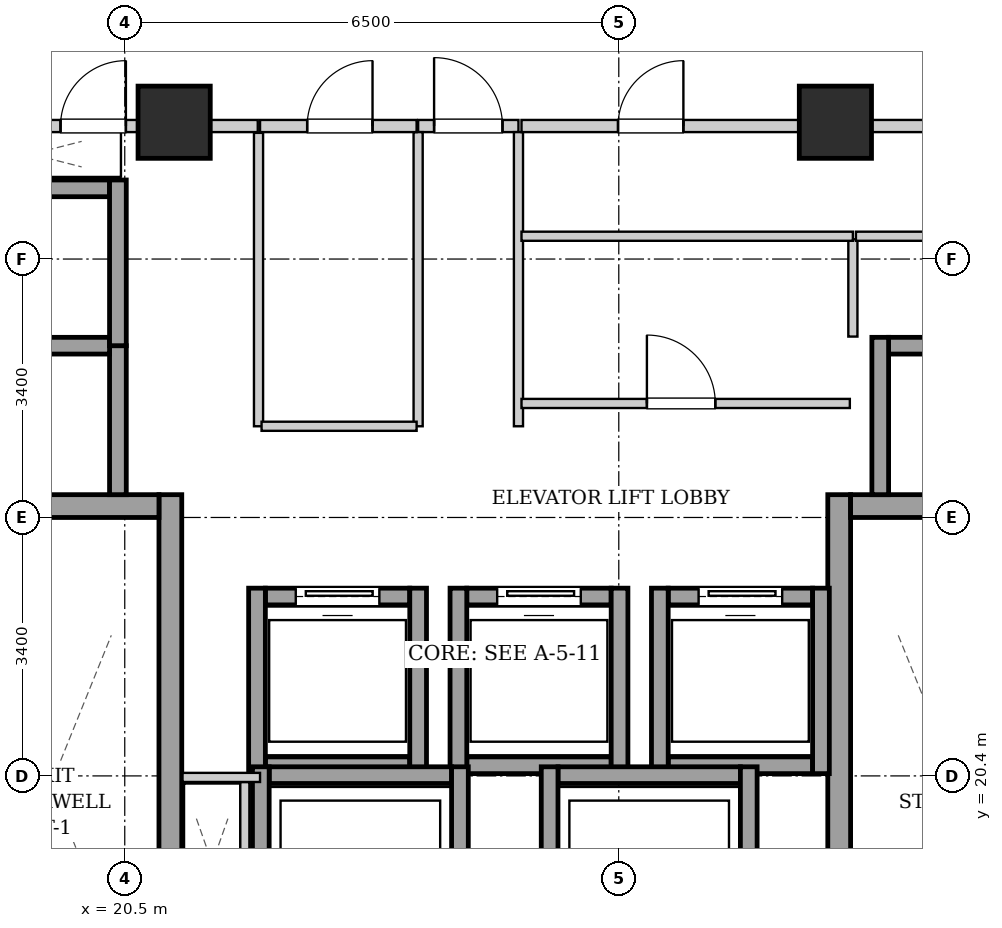
"""IFC4 building model, lengths in metres.
Left out: names, types, materials, properties, quantities, classifications, styles, units other than length and angle.
Written with IfcOpenShell. Run it as: python <this file> out.ifc"""

import sys

from ifc_helpers import new_model, si_unit, direction, frame, frame_2d, origin, origin_2d, place, context, subcontext, project, spatial, rectangle, extrude, element, fill, save


model = new_model("IFC4")
c1 = context("Model", 3, precision=1e-05, world=origin(), true_north=direction((0.0, 1.0)))
c2 = subcontext(c1, "Body", "Model", "MODEL_VIEW")
j1 = project(units=[si_unit("LENGTHUNIT", "METRE"), si_unit("PLANEANGLEUNIT", "RADIAN")], contexts=[c1])
p1 = place(None, origin())
s1 = spatial("IfcSite", under=j1, at=p1, CompositionType="ELEMENT")
p2 = place(p1, origin())
s2 = spatial("IfcBuilding", under=s1, at=p2, CompositionType="ELEMENT")
p3 = place(p2, frame((0.0, 0.0, 156.9)))
s3 = spatial("IfcBuildingStorey", under=s2, at=p3, CompositionType="ELEMENT", Elevation=156.9)
for number, where, z_axis, x_axis in (
    (1, (21.15, 29.0, 0.0), (0.0, 0.0, 1.0), (1.0, 0.0, 0.0)),
    (2, (29.85, 29.0, 0.0), (0.0, 0.0, 1.0), (1.0, 0.0, 0.0)),
):
    element("IfcColumn", number, at=place(p3, frame(where, z_axis=z_axis, x_axis=x_axis)), inside=s3, PredefinedType="COLUMN", context=c2, shape_type="SweptSolid", body=[
        extrude(rectangle(XDim=0.95, YDim=0.95, at=origin_2d()), origin(), (0.0, 0.0, 1.0), 3.25),
    ])
p4 = place(p3, frame((21.1, 15.1, 0.0), z_axis=(0.0, 0.0, 1.0), x_axis=(0.0, 1.0, 0.0)))
e3 = element("IfcWall", 3, at=p4, inside=s3, PredefinedType="SHEAR", context=c2, shape_type="SweptSolid", body=[
    extrude(rectangle(XDim=9.0, YDim=0.3, at=frame_2d((4.5, 0.0))), origin(), (0.0, 0.0, 1.0), 2.99),
])
p5 = place(p3, frame((18.1, 23.95, 0.0), z_axis=(0.0, 0.0, 1.0), x_axis=(1.0, 0.0, 0.0)))
e4 = element("IfcWall", 4, at=p5, inside=s3, PredefinedType="SHEAR", context=c2, shape_type="SweptSolid", body=[
    extrude(rectangle(XDim=2.85, YDim=0.3, at=frame_2d((1.425, 0.0))), origin(), (0.0, 0.0, 1.0), 2.99),
])
p6 = place(p3, frame((29.9, 15.1, 0.0), z_axis=(0.0, 0.0, 1.0), x_axis=(0.0, 1.0, 0.0)))
e5 = element("IfcWall", 5, at=p6, inside=s3, PredefinedType="SHEAR", context=c2, shape_type="SweptSolid", body=[
    extrude(rectangle(XDim=9.0, YDim=0.3, at=frame_2d((4.5, 0.0))), origin(), (0.0, 0.0, 1.0), 2.99),
])
p7 = place(p3, frame((30.05, 23.95, 0.0), z_axis=(0.0, 0.0, 1.0), x_axis=(1.0, 0.0, 0.0)))
e6 = element("IfcWall", 6, at=p7, inside=s3, PredefinedType="SHEAR", context=c2, shape_type="SweptSolid", body=[
    extrude(rectangle(XDim=2.85, YDim=0.3, at=frame_2d((1.425, 0.0))), origin(), (0.0, 0.0, 1.0), 2.99),
])
p8 = place(p3, frame((22.35, 20.54, 0.0), z_axis=(0.0, 0.0, 1.0), x_axis=(1.0, 0.0, 0.0)))
e7 = element("IfcWall", 7, at=p8, inside=s3, PredefinedType="SHEAR", context=c2, shape_type="SweptSolid", body=[
    extrude(rectangle(XDim=1.9, YDim=0.22, at=frame_2d((0.95, 0.0))), origin(), (0.0, 0.0, 1.0), 2.99),
])
p9 = place(p3, frame((22.35, 22.76, 0.0), z_axis=(0.0, 0.0, 1.0), x_axis=(1.0, 0.0, 0.0)))
e8 = element("IfcWall", 8, at=p9, inside=s3, PredefinedType="SHEAR", context=c2, shape_type="SweptSolid", body=[
    extrude(rectangle(XDim=1.9, YDim=0.22, at=frame_2d((0.95, 0.0))), origin(), (0.0, 0.0, 1.0), 2.99),
])
p10 = place(p9, frame((0.4, 0.0, 0.0)))
e9 = element("IfcOpeningElement", 9, at=p10, cuts=e8, PredefinedType="OPENING", context=c2, shape_type="SweptSolid", body=[
    extrude(rectangle(XDim=1.1, YDim=2.15, at=frame_2d((0.55, 1.075))), frame((0.0, 0.12, 0.0), z_axis=(0.0, -1.0, 0.0), x_axis=(1.0, 0.0, 0.0)), (0.0, 0.0, 1.0), 0.24),
])
for number, where, z_axis, x_axis in (
    (10, (22.24, 20.43, 0.0), (0.0, 0.0, 1.0), (0.0, 1.0, 0.0)),
    (11, (24.36, 20.43, 0.0), (0.0, 0.0, 1.0), (0.0, 1.0, 0.0)),
):
    element("IfcWall", number, at=place(p3, frame(where, z_axis=z_axis, x_axis=x_axis)), inside=s3, PredefinedType="SHEAR", context=c2, shape_type="SweptSolid", body=[
        extrude(rectangle(XDim=2.44, YDim=0.22, at=frame_2d((1.22, 0.0))), origin(), (0.0, 0.0, 1.0), 2.99),
    ])
p11 = place(p3, frame((25.0, 20.54, 0.0), z_axis=(0.0, 0.0, 1.0), x_axis=(1.0, 0.0, 0.0)))
e12 = element("IfcWall", 12, at=p11, inside=s3, PredefinedType="SHEAR", context=c2, shape_type="SweptSolid", body=[
    extrude(rectangle(XDim=1.9, YDim=0.22, at=frame_2d((0.95, 0.0))), origin(), (0.0, 0.0, 1.0), 2.99),
])
p12 = place(p3, frame((25.0, 22.76, 0.0), z_axis=(0.0, 0.0, 1.0), x_axis=(1.0, 0.0, 0.0)))
e13 = element("IfcWall", 13, at=p12, inside=s3, PredefinedType="SHEAR", context=c2, shape_type="SweptSolid", body=[
    extrude(rectangle(XDim=1.9, YDim=0.22, at=frame_2d((0.95, 0.0))), origin(), (0.0, 0.0, 1.0), 2.99),
])
p13 = place(p12, frame((0.4, 0.0, 0.0)))
e14 = element("IfcOpeningElement", 14, at=p13, cuts=e13, PredefinedType="OPENING", context=c2, shape_type="SweptSolid", body=[
    extrude(rectangle(XDim=1.1, YDim=2.15, at=frame_2d((0.55, 1.075))), frame((0.0, 0.12, 0.0), z_axis=(0.0, -1.0, 0.0), x_axis=(1.0, 0.0, 0.0)), (0.0, 0.0, 1.0), 0.24),
])
for number, where, z_axis, x_axis in (
    (15, (24.89, 20.43, 0.0), (0.0, 0.0, 1.0), (0.0, 1.0, 0.0)),
    (16, (27.01, 20.43, 0.0), (0.0, 0.0, 1.0), (0.0, 1.0, 0.0)),
):
    element("IfcWall", number, at=place(p3, frame(where, z_axis=z_axis, x_axis=x_axis)), inside=s3, PredefinedType="SHEAR", context=c2, shape_type="SweptSolid", body=[
        extrude(rectangle(XDim=2.44, YDim=0.22, at=frame_2d((1.22, 0.0))), origin(), (0.0, 0.0, 1.0), 2.99),
    ])
p14 = place(p3, frame((27.65, 20.54, 0.0), z_axis=(0.0, 0.0, 1.0), x_axis=(1.0, 0.0, 0.0)))
e17 = element("IfcWall", 17, at=p14, inside=s3, PredefinedType="SHEAR", context=c2, shape_type="SweptSolid", body=[
    extrude(rectangle(XDim=1.9, YDim=0.22, at=frame_2d((0.95, 0.0))), origin(), (0.0, 0.0, 1.0), 2.99),
])
p15 = place(p3, frame((27.65, 22.76, 0.0), z_axis=(0.0, 0.0, 1.0), x_axis=(1.0, 0.0, 0.0)))
e18 = element("IfcWall", 18, at=p15, inside=s3, PredefinedType="SHEAR", context=c2, shape_type="SweptSolid", body=[
    extrude(rectangle(XDim=1.9, YDim=0.22, at=frame_2d((0.95, 0.0))), origin(), (0.0, 0.0, 1.0), 2.99),
])
p16 = place(p15, frame((0.4, 0.0, 0.0)))
e19 = element("IfcOpeningElement", 19, at=p16, cuts=e18, PredefinedType="OPENING", context=c2, shape_type="SweptSolid", body=[
    extrude(rectangle(XDim=1.1, YDim=2.15, at=frame_2d((0.55, 1.075))), frame((0.0, 0.12, 0.0), z_axis=(0.0, -1.0, 0.0), x_axis=(1.0, 0.0, 0.0)), (0.0, 0.0, 1.0), 0.24),
])
for number, where, z_axis, x_axis in (
    (20, (27.54, 20.43, 0.0), (0.0, 0.0, 1.0), (0.0, 1.0, 0.0)),
    (21, (29.66, 20.43, 0.0), (0.0, 0.0, 1.0), (0.0, 1.0, 0.0)),
):
    element("IfcWall", number, at=place(p3, frame(where, z_axis=z_axis, x_axis=x_axis)), inside=s3, PredefinedType="SHEAR", context=c2, shape_type="SweptSolid", body=[
        extrude(rectangle(XDim=2.44, YDim=0.22, at=frame_2d((1.22, 0.0))), origin(), (0.0, 0.0, 1.0), 2.99),
    ])
p17 = place(p3, frame((20.41, 24.1, 0.0), z_axis=(0.0, 0.0, 1.0), x_axis=(0.0, 1.0, 0.0)))
e22 = element("IfcWall", 22, at=p17, inside=s3, PredefinedType="SHEAR", context=c2, shape_type="SweptSolid", body=[
    extrude(rectangle(XDim=1.96, YDim=0.22, at=frame_2d((0.98, 0.0))), origin(), (0.0, 0.0, 1.0), 2.99),
])
for number, where, z_axis, x_axis in (
    (23, (18.4, 26.06, 0.0), (0.0, 0.0, 1.0), (1.0, 0.0, 0.0)),
    (24, (18.4, 28.13, 0.0), (0.0, 0.0, 1.0), (1.0, 0.0, 0.0)),
):
    element("IfcWall", number, at=place(p3, frame(where, z_axis=z_axis, x_axis=x_axis)), inside=s3, PredefinedType="SHEAR", context=c2, shape_type="SweptSolid", body=[
        extrude(rectangle(XDim=1.9, YDim=0.22, at=frame_2d((0.95, 0.0))), origin(), (0.0, 0.0, 1.0), 2.99),
    ])
p18 = place(p3, frame((20.41, 26.06, 0.0), z_axis=(0.0, 0.0, 1.0), x_axis=(0.0, 1.0, 0.0)))
e25 = element("IfcWall", 25, at=p18, inside=s3, PredefinedType="SHEAR", context=c2, shape_type="SweptSolid", body=[
    extrude(rectangle(XDim=2.18, YDim=0.22, at=frame_2d((1.09, 0.0))), origin(), (0.0, 0.0, 1.0), 2.99),
])
p19 = place(p3, frame((30.55, 26.06, 0.0), z_axis=(0.0, 0.0, 1.0), x_axis=(1.0, 0.0, 0.0)))
e26 = element("IfcWall", 26, at=p19, inside=s3, PredefinedType="SHEAR", context=c2, shape_type="SweptSolid", body=[
    extrude(rectangle(XDim=1.9, YDim=0.22, at=frame_2d((0.95, 0.0))), origin(), (0.0, 0.0, 1.0), 2.99),
])
p20 = place(p3, frame((30.44, 24.1, 0.0), z_axis=(0.0, 0.0, 1.0), x_axis=(0.0, 1.0, 0.0)))
e27 = element("IfcWall", 27, at=p20, inside=s3, PredefinedType="SHEAR", context=c2, shape_type="SweptSolid", body=[
    extrude(rectangle(XDim=2.07, YDim=0.22, at=frame_2d((1.035, 0.0))), origin(), (0.0, 0.0, 1.0), 2.99),
])
p21 = place(p3, frame((22.4, 20.41, 0.0), z_axis=(0.0, 0.0, 1.0), x_axis=(1.0, 0.0, 0.0)))
e28 = element("IfcWall", 28, at=p21, inside=s3, PredefinedType="SHEAR", context=c2, shape_type="SweptSolid", body=[
    extrude(rectangle(XDim=2.4, YDim=0.22, at=frame_2d((1.2, 0.0))), origin(), (0.0, 0.0, 1.0), 2.99),
])
for number, where, z_axis, x_axis in (
    (29, (22.29, 17.98, 0.0), (0.0, 0.0, 1.0), (0.0, 1.0, 0.0)),
    (30, (24.91, 17.98, 0.0), (0.0, 0.0, 1.0), (0.0, 1.0, 0.0)),
):
    element("IfcWall", number, at=place(p3, frame(where, z_axis=z_axis, x_axis=x_axis)), inside=s3, PredefinedType="SHEAR", context=c2, shape_type="SweptSolid", body=[
        extrude(rectangle(XDim=2.54, YDim=0.22, at=frame_2d((1.27, 0.0))), origin(), (0.0, 0.0, 1.0), 2.99),
    ])
p22 = place(p3, frame((26.2, 20.41, 0.0), z_axis=(0.0, 0.0, 1.0), x_axis=(1.0, 0.0, 0.0)))
e31 = element("IfcWall", 31, at=p22, inside=s3, PredefinedType="SHEAR", context=c2, shape_type="SweptSolid", body=[
    extrude(rectangle(XDim=2.4, YDim=0.22, at=frame_2d((1.2, 0.0))), origin(), (0.0, 0.0, 1.0), 2.99),
])
for number, where, z_axis, x_axis in (
    (32, (26.09, 17.98, 0.0), (0.0, 0.0, 1.0), (0.0, 1.0, 0.0)),
    (33, (28.71, 17.98, 0.0), (0.0, 0.0, 1.0), (0.0, 1.0, 0.0)),
):
    element("IfcWall", number, at=place(p3, frame(where, z_axis=z_axis, x_axis=x_axis)), inside=s3, PredefinedType="SHEAR", context=c2, shape_type="SweptSolid", body=[
        extrude(rectangle(XDim=2.54, YDim=0.22, at=frame_2d((1.27, 0.0))), origin(), (0.0, 0.0, 1.0), 2.99),
    ])
p23 = place(p3, frame((24.36, 28.95, 0.0), z_axis=(0.0, 0.0, 1.0), x_axis=(1.0, 0.0, 0.0)))
e34 = element("IfcWall", 34, at=p23, inside=s3, PredefinedType="PARTITIONING", context=c2, shape_type="SweptSolid", body=[
    extrude(rectangle(XDim=1.32, YDim=0.16, at=frame_2d((0.66, 0.0))), origin(), (0.0, 0.0, 1.0), 2.442),
])
p24 = place(p23, frame((0.21, 0.0, 0.0)))
e35 = element("IfcOpeningElement", 35, at=p24, cuts=e34, PredefinedType="OPENING", context=c2, shape_type="SweptSolid", body=[
    extrude(rectangle(XDim=0.9, YDim=2.05, at=frame_2d((0.45, 1.025))), frame((0.0, 0.09, 0.0), z_axis=(0.0, -1.0, 0.0), x_axis=(1.0, 0.0, 0.0)), (0.0, 0.0, 1.0), 0.18),
])
p25 = place(p3, frame((17.96, 28.95, 0.0), z_axis=(0.0, 0.0, 1.0), x_axis=(1.0, 0.0, 0.0)))
e36 = element("IfcWall", 36, at=p25, inside=s3, PredefinedType="PARTITIONING", context=c2, shape_type="SweptSolid", body=[
    extrude(rectangle(XDim=4.29, YDim=0.16, at=frame_2d((2.145, 0.0))), origin(), (0.0, 0.0, 1.0), 2.442),
])
p26 = place(p25, frame((1.695, 0.0, 0.0)))
e37 = element("IfcOpeningElement", 37, at=p26, cuts=e36, PredefinedType="OPENING", context=c2, shape_type="SweptSolid", body=[
    extrude(rectangle(XDim=0.86, YDim=2.05, at=frame_2d((0.43, 1.025))), frame((0.0, 0.09, 0.0), z_axis=(0.0, -1.0, 0.0), x_axis=(1.0, 0.0, 0.0)), (0.0, 0.0, 1.0), 0.18),
])
p27 = place(p3, frame((22.08, 18.2, 0.0), z_axis=(0.0, 0.0, 1.0), x_axis=(0.0, 1.0, 0.0)))
e38 = element("IfcWall", 38, at=p27, inside=s3, PredefinedType="PARTITIONING", context=c2, shape_type="SweptSolid", body=[
    extrude(rectangle(XDim=2.12, YDim=0.12, at=frame_2d((1.06, 0.0))), origin(), (0.0, 0.0, 1.0), 2.99),
])
p28 = place(p3, frame((22.28, 20.38, 0.0), z_axis=(0.0, 0.0, 1.0), x_axis=(-1.0, 0.0, 0.0)))
e39 = element("IfcWall", 39, at=p28, inside=s3, PredefinedType="PARTITIONING", context=c2, shape_type="SweptSolid", body=[
    extrude(rectangle(XDim=1.02, YDim=0.12, at=frame_2d((0.51, 0.0))), origin(), (0.0, 0.0, 1.0), 2.99),
])
for number, where, z_axis, x_axis in (
    (40, (24.36, 25.0, 0.0), (0.0, 0.0, 1.0), (0.0, 1.0, 0.0)),
    (41, (25.68, 25.0, 0.0), (0.0, 0.0, 1.0), (0.0, 1.0, 0.0)),
):
    element("IfcWall", number, at=place(p3, frame(where, z_axis=z_axis, x_axis=x_axis)), inside=s3, PredefinedType="PARTITIONING", context=c2, shape_type="SweptSolid", body=[
        extrude(rectangle(XDim=3.87, YDim=0.12, at=frame_2d((1.935, 0.0))), origin(), (0.0, 0.0, 1.0), 2.99),
    ])
p29 = place(p3, frame((30.08, 26.18, 0.0), z_axis=(0.0, 0.0, 1.0), x_axis=(0.0, 1.0, 0.0)))
e42 = element("IfcWall", 42, at=p29, inside=s3, PredefinedType="PARTITIONING", context=c2, shape_type="SweptSolid", body=[
    extrude(rectangle(XDim=1.28, YDim=0.12, at=frame_2d((0.64, 0.0))), origin(), (0.0, 0.0, 1.0), 2.99),
])
p30 = place(p3, frame((30.12, 27.5, 0.0), z_axis=(0.0, 0.0, 1.0), x_axis=(1.0, 0.0, 0.0)))
e43 = element("IfcWall", 43, at=p30, inside=s3, PredefinedType="PARTITIONING", context=c2, shape_type="SweptSolid", body=[
    extrude(rectangle(XDim=2.92, YDim=0.12, at=frame_2d((1.46, 0.0))), origin(), (0.0, 0.0, 1.0), 2.99),
])
p31 = place(p30, frame((0.97, 0.0, 0.0)))
e44 = element("IfcOpeningElement", 44, at=p31, cuts=e43, PredefinedType="OPENING", context=c2, shape_type="SweptSolid", body=[
    extrude(rectangle(XDim=0.86, YDim=2.05, at=frame_2d((0.43, 1.025))), frame((0.0, 0.07, 0.0), z_axis=(0.0, -1.0, 0.0), x_axis=(1.0, 0.0, 0.0)), (0.0, 0.0, 1.0), 0.14),
])
p32 = place(p3, frame((22.26, 25.0, 0.0), z_axis=(0.0, 0.0, 1.0), x_axis=(0.0, 1.0, 0.0)))
e45 = element("IfcWall", 45, at=p32, inside=s3, PredefinedType="PARTITIONING", context=c2, shape_type="SweptSolid", body=[
    extrude(rectangle(XDim=3.86, YDim=0.12, at=frame_2d((1.93, 0.0))), origin(), (0.0, 0.0, 1.0), 2.99),
])
p33 = place(p3, frame((22.3, 25.0, 0.0), z_axis=(0.0, 0.0, 1.0), x_axis=(1.0, 0.0, 0.0)))
e46 = element("IfcWall", 46, at=p33, inside=s3, PredefinedType="PARTITIONING", context=c2, shape_type="SweptSolid", body=[
    extrude(rectangle(XDim=2.04, YDim=0.12, at=frame_2d((1.02, 0.0))), origin(), (0.0, 0.0, 1.0), 2.99),
])
p34 = place(p3, frame((22.28, 28.95, 0.0), z_axis=(0.0, 0.0, 1.0), x_axis=(1.0, 0.0, 0.0)))
e47 = element("IfcWall", 47, at=p34, inside=s3, PredefinedType="PARTITIONING", context=c2, shape_type="SweptSolid", body=[
    extrude(rectangle(XDim=2.06, YDim=0.16, at=frame_2d((1.03, 0.0))), origin(), (0.0, 0.0, 1.0), 2.442),
])
p35 = place(p34, frame((0.62, 0.0, 0.0)))
e48 = element("IfcOpeningElement", 48, at=p35, cuts=e47, PredefinedType="OPENING", context=c2, shape_type="SweptSolid", body=[
    extrude(rectangle(XDim=0.86, YDim=2.05, at=frame_2d((0.43, 1.025))), frame((0.0, 0.09, 0.0), z_axis=(0.0, -1.0, 0.0), x_axis=(1.0, 0.0, 0.0)), (0.0, 0.0, 1.0), 0.18),
])
p36 = place(p3, frame((25.72, 27.5, 0.0), z_axis=(0.0, 0.0, 1.0), x_axis=(1.0, 0.0, 0.0)))
e49 = element("IfcWall", 49, at=p36, inside=s3, PredefinedType="PARTITIONING", context=c2, shape_type="SweptSolid", body=[
    extrude(rectangle(XDim=4.36, YDim=0.12, at=frame_2d((2.18, 0.0))), origin(), (0.0, 0.0, 1.0), 2.99),
])
p37 = place(p3, frame((25.72, 25.3, 0.0), z_axis=(0.0, 0.0, 1.0), x_axis=(1.0, 0.0, 0.0)))
e50 = element("IfcWall", 50, at=p37, inside=s3, PredefinedType="PARTITIONING", context=c2, shape_type="SweptSolid", body=[
    extrude(rectangle(XDim=4.32, YDim=0.12, at=frame_2d((2.16, 0.0))), origin(), (0.0, 0.0, 1.0), 2.99),
])
p38 = place(p37, frame((1.65, 0.0, 0.0)))
e51 = element("IfcOpeningElement", 51, at=p38, cuts=e50, PredefinedType="OPENING", context=c2, shape_type="SweptSolid", body=[
    extrude(rectangle(XDim=0.9, YDim=2.05, at=frame_2d((0.45, 1.025))), frame((0.0, 0.07, 0.0), z_axis=(0.0, -1.0, 0.0), x_axis=(1.0, 0.0, 0.0)), (0.0, 0.0, 1.0), 0.14),
])
p39 = place(p3, frame((25.72, 28.95, 0.0), z_axis=(0.0, 0.0, 1.0), x_axis=(1.0, 0.0, 0.0)))
e52 = element("IfcWall", 52, at=p39, inside=s3, PredefinedType="PARTITIONING", context=c2, shape_type="SweptSolid", body=[
    extrude(rectangle(XDim=7.32, YDim=0.16, at=frame_2d((3.66, 0.0))), origin(), (0.0, 0.0, 1.0), 2.442),
])
p40 = place(p39, frame((1.27, 0.0, 0.0)))
e53 = element("IfcOpeningElement", 53, at=p40, cuts=e52, PredefinedType="OPENING", context=c2, shape_type="SweptSolid", body=[
    extrude(rectangle(XDim=0.86, YDim=2.05, at=frame_2d((0.43, 1.025))), frame((0.0, 0.09, 0.0), z_axis=(0.0, -1.0, 0.0), x_axis=(1.0, 0.0, 0.0)), (0.0, 0.0, 1.0), 0.18),
])
p41 = place(p10, origin())
e54 = element("IfcDoor", 54, at=p41, inside=s3, OperationType="SLIDING_TO_LEFT", PredefinedType="DOOR", context=c2, shape_type="SweptSolid", body=[
    extrude(rectangle(XDim=1.1, YDim=2.15, at=frame_2d((0.55, 1.075))), frame((0.0, 0.025, 0.0), z_axis=(0.0, -1.0, 0.0), x_axis=(1.0, 0.0, 0.0)), (0.0, 0.0, 1.0), 0.05),
])
fill(e9, e54)
p42 = place(p13, origin())
e55 = element("IfcDoor", 55, at=p42, inside=s3, OperationType="SLIDING_TO_LEFT", PredefinedType="DOOR", context=c2, shape_type="SweptSolid", body=[
    extrude(rectangle(XDim=1.1, YDim=2.15, at=frame_2d((0.55, 1.075))), frame((0.0, 0.025, 0.0), z_axis=(0.0, -1.0, 0.0), x_axis=(1.0, 0.0, 0.0)), (0.0, 0.0, 1.0), 0.05),
])
fill(e14, e55)
p43 = place(p16, origin())
e56 = element("IfcDoor", 56, at=p43, inside=s3, OperationType="SLIDING_TO_LEFT", PredefinedType="DOOR", context=c2, shape_type="SweptSolid", body=[
    extrude(rectangle(XDim=1.1, YDim=2.15, at=frame_2d((0.55, 1.075))), frame((0.0, 0.025, 0.0), z_axis=(0.0, -1.0, 0.0), x_axis=(1.0, 0.0, 0.0)), (0.0, 0.0, 1.0), 0.05),
])
fill(e19, e56)
p44 = place(p24, origin())
e57 = element("IfcDoor", 57, at=p44, inside=s3, OperationType="SINGLE_SWING_LEFT", PredefinedType="DOOR", context=c2, shape_type="SweptSolid", body=[
    extrude(rectangle(XDim=0.9, YDim=2.05, at=frame_2d((0.45, 1.025))), frame((0.0, 0.025, 0.0), z_axis=(0.0, -1.0, 0.0), x_axis=(1.0, 0.0, 0.0)), (0.0, 0.0, 1.0), 0.05),
])
fill(e35, e57)
p45 = place(p26, origin())
e58 = element("IfcDoor", 58, at=p45, inside=s3, OperationType="SINGLE_SWING_RIGHT", PredefinedType="DOOR", context=c2, shape_type="SweptSolid", body=[
    extrude(rectangle(XDim=0.86, YDim=2.05, at=frame_2d((0.43, 1.025))), frame((0.0, 0.025, 0.0), z_axis=(0.0, -1.0, 0.0), x_axis=(1.0, 0.0, 0.0)), (0.0, 0.0, 1.0), 0.05),
])
fill(e37, e58)
p46 = place(p35, origin())
e59 = element("IfcDoor", 59, at=p46, inside=s3, OperationType="SINGLE_SWING_RIGHT", PredefinedType="DOOR", context=c2, shape_type="SweptSolid", body=[
    extrude(rectangle(XDim=0.86, YDim=2.05, at=frame_2d((0.43, 1.025))), frame((0.0, 0.025, 0.0), z_axis=(0.0, -1.0, 0.0), x_axis=(1.0, 0.0, 0.0)), (0.0, 0.0, 1.0), 0.05),
])
fill(e48, e59)
p47 = place(p38, origin())
e60 = element("IfcDoor", 60, at=p47, inside=s3, OperationType="SINGLE_SWING_LEFT", PredefinedType="DOOR", context=c2, shape_type="SweptSolid", body=[
    extrude(rectangle(XDim=0.9, YDim=2.05, at=frame_2d((0.45, 1.025))), frame((0.0, 0.025, 0.0), z_axis=(0.0, -1.0, 0.0), x_axis=(1.0, 0.0, 0.0)), (0.0, 0.0, 1.0), 0.05),
])
fill(e51, e60)
p48 = place(p40, origin())
e61 = element("IfcDoor", 61, at=p48, inside=s3, OperationType="SINGLE_SWING_RIGHT", PredefinedType="DOOR", context=c2, shape_type="SweptSolid", body=[
    extrude(rectangle(XDim=0.86, YDim=2.05, at=frame_2d((0.43, 1.025))), frame((0.0, 0.025, 0.0), z_axis=(0.0, -1.0, 0.0), x_axis=(1.0, 0.0, 0.0)), (0.0, 0.0, 1.0), 0.05),
])
fill(e53, e61)
save(model, sys.argv[1])
